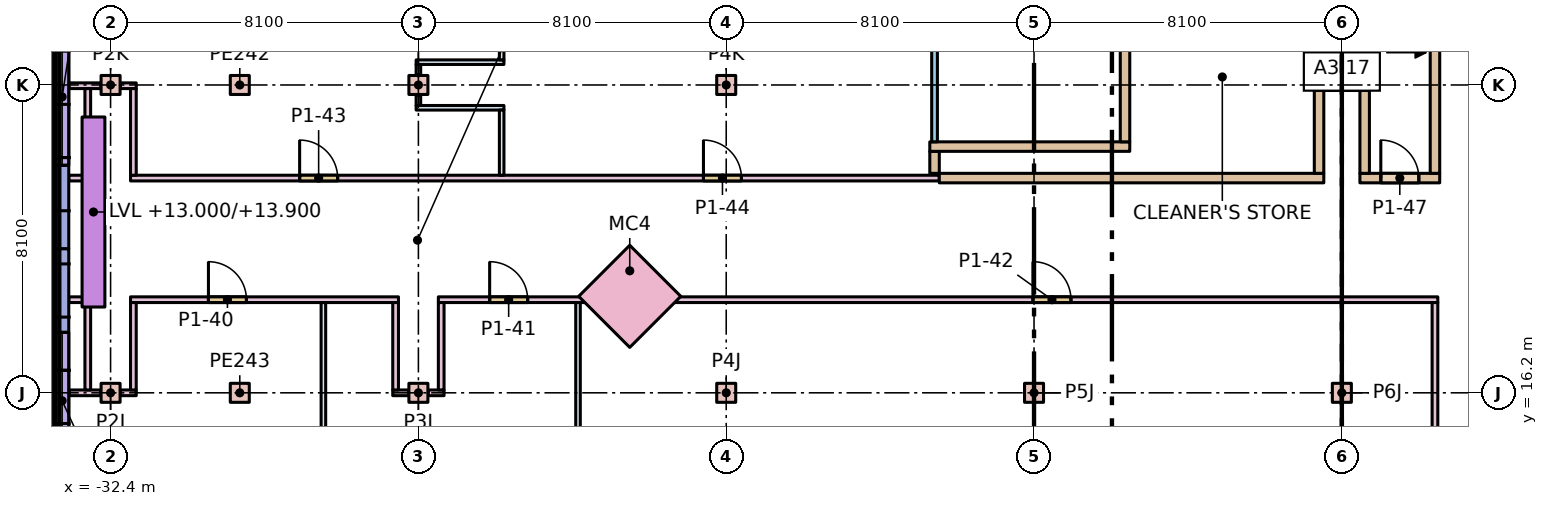
"""IFC4 building model, lengths in metres.
Left out: names, types, materials, properties, quantities, classifications, styles, units other than length and angle.
Written with IfcOpenShell. Run it as: python <this file> out.ifc"""

import sys

from ifc_helpers import new_model, si_unit, direction, frame, frame_2d, origin, origin_2d, place, context, subcontext, project, spatial, rectangle, extrude, element, fill, save


model = new_model("IFC4")
c1 = context("Model", 3, precision=1e-05, world=origin(), true_north=direction((0.0, 1.0)))
c2 = subcontext(c1, "Body", "Model", "MODEL_VIEW")
j1 = project(units=[si_unit("LENGTHUNIT", "METRE"), si_unit("PLANEANGLEUNIT", "RADIAN")], contexts=[c1])
p1 = place(None, origin())
s1 = spatial("IfcSite", under=j1, at=p1, CompositionType="ELEMENT")
p2 = place(p1, origin())
s2 = spatial("IfcBuilding", under=s1, at=p2, CompositionType="ELEMENT")
p3 = place(p2, frame((0.0, 0.0, 6.0)))
s3 = spatial("IfcBuildingStorey", under=s2, at=p3, CompositionType="ELEMENT", Elevation=6.0)
for number, where, z_axis, x_axis in (
    (1, (-32.4, 16.2, 0.0), (0.0, 0.0, 1.0), (1.0, 0.0, 0.0)),
    (2, (-32.4, 24.3, 0.0), (0.0, 0.0, 1.0), (1.0, 0.0, 0.0)),
    (3, (-24.3, 16.2, 0.0), (0.0, 0.0, 1.0), (1.0, 0.0, 0.0)),
    (4, (-24.3, 24.3, 0.0), (0.0, 0.0, 1.0), (1.0, 0.0, 0.0)),
    (5, (-16.2, 16.2, 0.0), (0.0, 0.0, 1.0), (1.0, 0.0, 0.0)),
    (6, (-16.2, 24.3, 0.0), (0.0, 0.0, 1.0), (1.0, 0.0, 0.0)),
    (7, (-8.1, 16.2, 0.0), (0.0, 0.0, 1.0), (1.0, 0.0, 0.0)),
    (8, (0.0, 16.2, 0.0), (0.0, 0.0, 1.0), (1.0, 0.0, 0.0)),
    (9, (-29.0, 24.3, 0.0), (0.0, 0.0, 1.0), (1.0, 0.0, 0.0)),
    (10, (-29.0, 16.2, 0.0), (0.0, 0.0, 1.0), (1.0, 0.0, 0.0)),
):
    element("IfcColumn", number, at=place(p3, frame(where, z_axis=z_axis, x_axis=x_axis)), inside=s3, PredefinedType="COLUMN", context=c2, shape_type="SweptSolid", body=[
        extrude(rectangle(XDim=0.5, YDim=0.5, at=origin_2d()), origin(), (0.0, 0.0, 1.0), 7.0),
    ])
p4 = place(p3, frame((-18.738, 18.738, 0.0), z_axis=(0.0, 0.0, 1.0), x_axis=(-0.707106781187, -0.707106781187, 0.0)))
e11 = element("IfcColumn", 11, at=p4, inside=s3, PredefinedType="COLUMN", context=c2, shape_type="SweptSolid", body=[
    extrude(rectangle(XDim=1.9, YDim=1.9, at=origin_2d()), origin(), (0.0, 0.0, 1.0), 7.0),
])
p5 = place(p3, frame((-33.675, 27.984, 0.0), z_axis=(0.0, 0.0, 1.0), x_axis=(0.0, -1.0, 0.0)))
e12 = element("IfcWall", 12, at=p5, inside=s3, PredefinedType="STANDARD", context=c2, shape_type="SweptSolid", body=[
    extrude(rectangle(XDim=7.995, YDim=0.35, at=frame_2d((3.998, 0.0))), origin(), (0.0, 0.0, 1.0), 6.68),
])
p6 = place(p5, frame((2.198, 0.0, 1.0)))
e13 = element("IfcOpeningElement", 13, at=p6, cuts=e12, PredefinedType="OPENING", context=c2, shape_type="SweptSolid", body=[
    extrude(rectangle(XDim=3.6, YDim=4.0, at=frame_2d((1.8, 2.0))), frame((0.0, 0.185, 0.0), z_axis=(0.0, -1.0, 0.0), x_axis=(1.0, 0.0, 0.0)), (0.0, 0.0, 1.0), 0.37),
])
p7 = place(p3, frame((-33.675, 19.989, 0.0), z_axis=(0.0, 0.0, 1.0), x_axis=(0.0, -1.0, 0.0)))
e14 = element("IfcWall", 14, at=p7, inside=s3, PredefinedType="STANDARD", context=c2, shape_type="SweptSolid", body=[
    extrude(rectangle(XDim=7.995, YDim=0.35, at=frame_2d((3.998, 0.0))), origin(), (0.0, 0.0, 1.0), 6.68),
])
p8 = place(p7, frame((2.198, 0.0, 1.0)))
e15 = element("IfcOpeningElement", 15, at=p8, cuts=e14, PredefinedType="OPENING", context=c2, shape_type="SweptSolid", body=[
    extrude(rectangle(XDim=3.6, YDim=4.0, at=frame_2d((1.8, 2.0))), frame((0.0, 0.185, 0.0), z_axis=(0.0, -1.0, 0.0), x_axis=(1.0, 0.0, 0.0)), (0.0, 0.0, 1.0), 0.37),
])
p9 = place(p3, frame((-32.85, 23.458, 7.0), z_axis=(0.0, 0.0, 1.0), x_axis=(0.0, -1.0, 0.0)))
e16 = element("IfcWall", 16, at=p9, inside=s3, PredefinedType="PARAPET", context=c2, shape_type="SweptSolid", body=[
    extrude(rectangle(XDim=5.0, YDim=0.6, at=frame_2d((2.5, 0.0))), origin(), (0.0, 0.0, 1.0), 0.9),
])
p10 = place(p3, frame((-10.593, 21.85, 0.0), z_axis=(0.0, 0.0, 1.0), x_axis=(1.0, 0.0, 0.0)))
e17 = element("IfcWall", 17, at=p10, inside=s3, PredefinedType="PARTITIONING", context=c2, shape_type="SweptSolid", body=[
    extrude(rectangle(XDim=10.118, YDim=0.25, at=frame_2d((5.059, 0.0))), origin(), (0.0, 0.0, 1.0), 6.68),
])
p11 = place(p3, frame((0.475, 21.85, 0.0), z_axis=(0.0, 0.0, 1.0), x_axis=(1.0, 0.0, 0.0)))
e18 = element("IfcWall", 18, at=p11, inside=s3, PredefinedType="PARTITIONING", context=c2, shape_type="SweptSolid", body=[
    extrude(rectangle(XDim=2.1, YDim=0.25, at=frame_2d((1.05, 0.0))), origin(), (0.0, 0.0, 1.0), 6.68),
])
p12 = place(p11, frame((0.55, 0.0, 0.0)))
e19 = element("IfcOpeningElement", 19, at=p12, cuts=e18, PredefinedType="OPENING", context=c2, shape_type="SweptSolid", body=[
    extrude(rectangle(XDim=1.0, YDim=2.1, at=frame_2d((0.5, 1.05))), frame((0.0, 0.135, 0.0), z_axis=(0.0, -1.0, 0.0), x_axis=(1.0, 0.0, 0.0)), (0.0, 0.0, 1.0), 0.27),
])
p13 = place(p3, frame((-0.725, 24.28, 0.0), z_axis=(0.0, 0.0, 1.0), x_axis=(1.0, 0.0, 0.0)))
e20 = element("IfcWall", 20, at=p13, inside=s3, PredefinedType="PARTITIONING", context=c2, shape_type="SweptSolid", body=[
    extrude(rectangle(XDim=1.45, YDim=0.25, at=frame_2d((0.725, 0.0))), origin(), (0.0, 0.0, 1.0), 6.68),
])
for number, where, z_axis, x_axis in (
    (21, (-0.6, 21.975, 0.0), (0.0, 0.0, 1.0), (0.0, 1.0, 0.0)),
    (22, (0.6, 21.975, 0.0), (0.0, 0.0, 1.0), (0.0, 1.0, 0.0)),
):
    element("IfcWall", number, at=place(p3, frame(where, z_axis=z_axis, x_axis=x_axis)), inside=s3, PredefinedType="PARTITIONING", context=c2, shape_type="SweptSolid", body=[
        extrude(rectangle(XDim=2.18, YDim=0.25, at=frame_2d((1.09, 0.0))), origin(), (0.0, 0.0, 1.0), 6.68),
    ])
p14 = place(p3, frame((-33.49, 16.2, 0.0), z_axis=(0.0, 0.0, 1.0), x_axis=(1.0, 0.0, 0.0)))
e23 = element("IfcWall", 23, at=p14, inside=s3, PredefinedType="PARTITIONING", context=c2, shape_type="SweptSolid", body=[
    extrude(rectangle(XDim=0.83, YDim=0.15, at=frame_2d((0.415, 0.0))), origin(), (0.0, 0.0, 1.0), 6.68),
])
p15 = place(p3, frame((-32.14, 16.2, 0.0), z_axis=(0.0, 0.0, 1.0), x_axis=(1.0, 0.0, 0.0)))
e24 = element("IfcWall", 24, at=p15, inside=s3, PredefinedType="PARTITIONING", context=c2, shape_type="SweptSolid", body=[
    extrude(rectangle(XDim=0.415, YDim=0.15, at=frame_2d((0.208, 0.0))), origin(), (0.0, 0.0, 1.0), 6.68),
])
p16 = place(p3, frame((-33.5, 18.65, 0.0), z_axis=(0.0, 0.0, 1.0), x_axis=(1.0, 0.0, 0.0)))
e25 = element("IfcWall", 25, at=p16, inside=s3, PredefinedType="PARTITIONING", context=c2, shape_type="SweptSolid", body=[
    extrude(rectangle(XDim=0.575, YDim=0.15, at=frame_2d((0.288, 0.0))), origin(), (0.0, 0.0, 1.0), 6.68),
])
p17 = place(p3, frame((-31.875, 18.65, 0.0), z_axis=(0.0, 0.0, 1.0), x_axis=(1.0, 0.0, 0.0)))
e26 = element("IfcWall", 26, at=p17, inside=s3, PredefinedType="PARTITIONING", context=c2, shape_type="SweptSolid", body=[
    extrude(rectangle(XDim=7.05, YDim=0.15, at=frame_2d((3.525, 0.0))), origin(), (0.0, 0.0, 1.0), 6.68),
])
p18 = place(p17, frame((2.05, 0.0, 0.0)))
e27 = element("IfcOpeningElement", 27, at=p18, cuts=e26, PredefinedType="OPENING", context=c2, shape_type="SweptSolid", body=[
    extrude(rectangle(XDim=1.0, YDim=2.1, at=frame_2d((0.5, 1.05))), frame((0.0, 0.085, 0.0), z_axis=(0.0, -1.0, 0.0), x_axis=(1.0, 0.0, 0.0)), (0.0, 0.0, 1.0), 0.17),
])
for number, where, z_axis, x_axis in (
    (28, (-33.0, 16.275, 0.0), (0.0, 0.0, 1.0), (0.0, 1.0, 0.0)),
    (29, (-31.8, 16.275, 0.0), (0.0, 0.0, 1.0), (0.0, 1.0, 0.0)),
):
    element("IfcWall", number, at=place(p3, frame(where, z_axis=z_axis, x_axis=x_axis)), inside=s3, PredefinedType="PARTITIONING", context=c2, shape_type="SweptSolid", body=[
        extrude(rectangle(XDim=2.3, YDim=0.15, at=frame_2d((1.15, 0.0))), origin(), (0.0, 0.0, 1.0), 6.68),
    ])
for number, where, z_axis, x_axis in (
    (30, (-24.975, 16.2, 0.0), (0.0, 0.0, 1.0), (1.0, 0.0, 0.0)),
    (31, (-24.04, 16.2, 0.0), (0.0, 0.0, 1.0), (1.0, 0.0, 0.0)),
):
    element("IfcWall", number, at=place(p3, frame(where, z_axis=z_axis, x_axis=x_axis)), inside=s3, PredefinedType="PARTITIONING", context=c2, shape_type="SweptSolid", body=[
        extrude(rectangle(XDim=0.415, YDim=0.15, at=frame_2d((0.208, 0.0))), origin(), (0.0, 0.0, 1.0), 6.68),
    ])
p19 = place(p3, frame((-23.775, 18.65, 0.0), z_axis=(0.0, 0.0, 1.0), x_axis=(1.0, 0.0, 0.0)))
e32 = element("IfcWall", 32, at=p19, inside=s3, PredefinedType="PARTITIONING", context=c2, shape_type="SweptSolid", body=[
    extrude(rectangle(XDim=4.077, YDim=0.15, at=frame_2d((2.038, 0.0))), origin(), (0.0, 0.0, 1.0), 6.68),
])
p20 = place(p19, frame((1.35, 0.0, 0.0)))
e33 = element("IfcOpeningElement", 33, at=p20, cuts=e32, PredefinedType="OPENING", context=c2, shape_type="SweptSolid", body=[
    extrude(rectangle(XDim=1.0, YDim=2.1, at=frame_2d((0.5, 1.05))), frame((0.0, 0.085, 0.0), z_axis=(0.0, -1.0, 0.0), x_axis=(1.0, 0.0, 0.0)), (0.0, 0.0, 1.0), 0.17),
])
for number, where, z_axis, x_axis in (
    (34, (-24.9, 16.275, 0.0), (0.0, 0.0, 1.0), (0.0, 1.0, 0.0)),
    (35, (-23.7, 16.275, 0.0), (0.0, 0.0, 1.0), (0.0, 1.0, 0.0)),
):
    element("IfcWall", number, at=place(p3, frame(where, z_axis=z_axis, x_axis=x_axis)), inside=s3, PredefinedType="PARTITIONING", context=c2, shape_type="SweptSolid", body=[
        extrude(rectangle(XDim=2.3, YDim=0.15, at=frame_2d((1.15, 0.0))), origin(), (0.0, 0.0, 1.0), 6.68),
    ])
p21 = place(p3, frame((-17.778, 18.65, 0.0), z_axis=(0.0, 0.0, 1.0), x_axis=(1.0, 0.0, 0.0)))
e36 = element("IfcWall", 36, at=p21, inside=s3, PredefinedType="PARTITIONING", context=c2, shape_type="SweptSolid", body=[
    extrude(rectangle(XDim=20.303, YDim=0.15, at=frame_2d((10.152, 0.0))), origin(), (0.0, 0.0, 1.0), 6.68),
])
p22 = place(p21, frame((9.65, 0.0, 0.0)))
e37 = element("IfcOpeningElement", 37, at=p22, cuts=e36, PredefinedType="OPENING", context=c2, shape_type="SweptSolid", body=[
    extrude(rectangle(XDim=1.0, YDim=2.1, at=frame_2d((0.5, 1.05))), frame((0.0, 0.085, 0.0), z_axis=(0.0, -1.0, 0.0), x_axis=(1.0, 0.0, 0.0)), (0.0, 0.0, 1.0), 0.17),
])
p23 = place(p3, frame((-33.5, 21.85, 0.0), z_axis=(0.0, 0.0, 1.0), x_axis=(1.0, 0.0, 0.0)))
e38 = element("IfcWall", 38, at=p23, inside=s3, PredefinedType="PARTITIONING", context=c2, shape_type="SweptSolid", body=[
    extrude(rectangle(XDim=0.575, YDim=0.15, at=frame_2d((0.288, 0.0))), origin(), (0.0, 0.0, 1.0), 6.68),
])
p24 = place(p3, frame((-31.875, 21.85, 0.0), z_axis=(0.0, 0.0, 1.0), x_axis=(1.0, 0.0, 0.0)))
e39 = element("IfcWall", 39, at=p24, inside=s3, PredefinedType="PARTITIONING", context=c2, shape_type="SweptSolid", body=[
    extrude(rectangle(XDim=21.282, YDim=0.15, at=frame_2d((10.641, 0.0))), origin(), (0.0, 0.0, 1.0), 6.68),
])
p25 = place(p24, frame((4.45, 0.0, 0.0)))
e40 = element("IfcOpeningElement", 40, at=p25, cuts=e39, PredefinedType="OPENING", context=c2, shape_type="SweptSolid", body=[
    extrude(rectangle(XDim=1.0, YDim=2.1, at=frame_2d((0.5, 1.05))), frame((0.0, 0.085, 0.0), z_axis=(0.0, -1.0, 0.0), x_axis=(1.0, 0.0, 0.0)), (0.0, 0.0, 1.0), 0.17),
])
p26 = place(p24, frame((15.076, 0.0, 0.0)))
e41 = element("IfcOpeningElement", 41, at=p26, cuts=e39, PredefinedType="OPENING", context=c2, shape_type="SweptSolid", body=[
    extrude(rectangle(XDim=1.0, YDim=2.1, at=frame_2d((0.5, 1.05))), frame((0.0, 0.085, 0.0), z_axis=(0.0, -1.0, 0.0), x_axis=(1.0, 0.0, 0.0)), (0.0, 0.0, 1.0), 0.17),
])
p27 = place(p3, frame((-33.49, 24.28, 0.0), z_axis=(0.0, 0.0, 1.0), x_axis=(1.0, 0.0, 0.0)))
e42 = element("IfcWall", 42, at=p27, inside=s3, PredefinedType="PARTITIONING", context=c2, shape_type="SweptSolid", body=[
    extrude(rectangle(XDim=0.83, YDim=0.15, at=frame_2d((0.415, 0.0))), origin(), (0.0, 0.0, 1.0), 6.68),
])
p28 = place(p3, frame((-32.14, 24.28, 0.0), z_axis=(0.0, 0.0, 1.0), x_axis=(1.0, 0.0, 0.0)))
e43 = element("IfcWall", 43, at=p28, inside=s3, PredefinedType="PARTITIONING", context=c2, shape_type="SweptSolid", body=[
    extrude(rectangle(XDim=0.415, YDim=0.15, at=frame_2d((0.208, 0.0))), origin(), (0.0, 0.0, 1.0), 6.68),
])
for number, where, z_axis, x_axis in (
    (44, (-33.0, 21.925, 0.0), (0.0, 0.0, 1.0), (0.0, 1.0, 0.0)),
    (45, (-31.8, 21.925, 0.0), (0.0, 0.0, 1.0), (0.0, 1.0, 0.0)),
):
    element("IfcWall", number, at=place(p3, frame(where, z_axis=z_axis, x_axis=x_axis)), inside=s3, PredefinedType="PARTITIONING", context=c2, shape_type="SweptSolid", body=[
        extrude(rectangle(XDim=2.28, YDim=0.15, at=frame_2d((1.14, 0.0))), origin(), (0.0, 0.0, 1.0), 6.68),
    ])
p29 = place(p3, frame((2.45, 21.975, 0.0), z_axis=(0.0, 0.0, 1.0), x_axis=(0.0, 1.0, 0.0)))
e46 = element("IfcWall", 46, at=p29, inside=s3, PredefinedType="PARTITIONING", context=c2, shape_type="SweptSolid", body=[
    extrude(rectangle(XDim=3.25, YDim=0.25, at=frame_2d((1.625, 0.0))), origin(), (0.0, 0.0, 1.0), 6.68),
])
p30 = place(p3, frame((2.45, 11.475, 0.0), z_axis=(0.0, 0.0, 1.0), x_axis=(0.0, 1.0, 0.0)))
e47 = element("IfcWall", 47, at=p30, inside=s3, PredefinedType="PARTITIONING", context=c2, shape_type="SweptSolid", body=[
    extrude(rectangle(XDim=7.1, YDim=0.15, at=frame_2d((3.55, 0.0))), origin(), (0.0, 0.0, 1.0), 6.68),
])
p31 = place(p3, frame((-10.718, 21.975, 0.0), z_axis=(0.0, 0.0, 1.0), x_axis=(0.0, 1.0, 0.0)))
e48 = element("IfcWall", 48, at=p31, inside=s3, PredefinedType="PARTITIONING", context=c2, shape_type="SweptSolid", body=[
    extrude(rectangle(XDim=0.579, YDim=0.25, at=frame_2d((0.289, 0.0))), origin(), (0.0, 0.0, 1.0), 6.68),
])
p32 = place(p3, frame((-10.843, 22.679, 0.0), z_axis=(0.0, 0.0, 1.0), x_axis=(1.0, 0.0, 0.0)))
e49 = element("IfcWall", 49, at=p32, inside=s3, PredefinedType="PARTITIONING", context=c2, shape_type="SweptSolid", body=[
    extrude(rectangle(XDim=5.262, YDim=0.25, at=frame_2d((2.631, 0.0))), origin(), (0.0, 0.0, 1.0), 6.68),
])
p33 = place(p3, frame((-5.706, 22.804, 0.0), z_axis=(0.0, 0.0, 1.0), x_axis=(0.0, 1.0, 0.0)))
e50 = element("IfcWall", 50, at=p33, inside=s3, PredefinedType="PARTITIONING", context=c2, shape_type="SweptSolid", body=[
    extrude(rectangle(XDim=6.893, YDim=0.25, at=frame_2d((3.446, 0.0))), origin(), (0.0, 0.0, 1.0), 6.68),
])
p34 = place(p3, frame((-26.8, 8.76, 0.0), z_axis=(0.0, 0.0, 1.0), x_axis=(0.0, 1.0, 0.0)))
e51 = element("IfcWall", 51, at=p34, inside=s3, PredefinedType="PARTITIONING", context=c2, shape_type="SweptSolid", body=[
    extrude(rectangle(XDim=9.815, YDim=0.12, at=frame_2d((4.907, 0.0))), origin(), (0.0, 0.0, 1.0), 6.68),
])
p35 = place(p3, frame((-20.1, -2.375, 0.0), z_axis=(0.0, 0.0, 1.0), x_axis=(0.0, 1.0, 0.0)))
e52 = element("IfcWall", 52, at=p35, inside=s3, PredefinedType="PARTITIONING", context=c2, shape_type="SweptSolid", body=[
    extrude(rectangle(XDim=20.95, YDim=0.12, at=frame_2d((10.475, 0.0))), origin(), (0.0, 0.0, 1.0), 6.68),
])
for number, where, z_axis, x_axis in (
    (53, (-24.36, 23.7, 0.0), (0.0, 0.0, 1.0), (1.0, 0.0, 0.0)),
    (54, (-24.36, 24.9, 0.0), (0.0, 0.0, 1.0), (1.0, 0.0, 0.0)),
):
    element("IfcWall", number, at=place(p3, frame(where, z_axis=z_axis, x_axis=x_axis)), inside=s3, PredefinedType="PARTITIONING", context=c2, shape_type="SweptSolid", body=[
        extrude(rectangle(XDim=2.311, YDim=0.12, at=frame_2d((1.156, 0.0))), origin(), (0.0, 0.0, 1.0), 6.68),
    ])
for number, where, z_axis, x_axis in (
    (55, (-24.3, 23.76, 0.0), (0.0, 0.0, 1.0), (0.0, 1.0, 0.0)),
    (56, (-24.3, 24.56, 0.0), (0.0, 0.0, 1.0), (0.0, 1.0, 0.0)),
):
    element("IfcWall", number, at=place(p3, frame(where, z_axis=z_axis, x_axis=x_axis)), inside=s3, PredefinedType="PARTITIONING", context=c2, shape_type="SweptSolid", body=[
        extrude(rectangle(XDim=0.28, YDim=0.12, at=frame_2d((0.14, 0.0))), origin(), (0.0, 0.0, 1.0), 6.68),
    ])
p36 = place(p3, frame((-22.109, 21.925, 0.0), z_axis=(0.0, 0.0, 1.0), x_axis=(0.0, 1.0, 0.0)))
e57 = element("IfcWall", 57, at=p36, inside=s3, PredefinedType="PARTITIONING", context=c2, shape_type="SweptSolid", body=[
    extrude(rectangle(XDim=1.715, YDim=0.12, at=frame_2d((0.857, 0.0))), origin(), (0.0, 0.0, 1.0), 6.68),
])
p37 = place(p3, frame((-22.109, 24.96, 0.0), z_axis=(0.0, 0.0, 1.0), x_axis=(0.0, 1.0, 0.0)))
e58 = element("IfcWall", 58, at=p37, inside=s3, PredefinedType="PARTITIONING", context=c2, shape_type="SweptSolid", body=[
    extrude(rectangle(XDim=6.78, YDim=0.12, at=frame_2d((3.39, 0.0))), origin(), (0.0, 0.0, 1.0), 6.68),
])
p38 = place(p3, frame((-10.718, 22.804, 0.0), z_axis=(0.0, 0.0, 1.0), x_axis=(0.0, 1.0, 0.0)))
e59 = element("IfcWall", 59, at=p38, inside=s3, PredefinedType="PARTITIONING", context=c2, shape_type="SweptSolid", body=[
    extrude(rectangle(XDim=11.771, YDim=0.15, at=frame_2d((5.886, 0.0))), origin(), (0.0, 0.0, 1.0), 6.68),
])
p39 = place(p6, origin())
e60 = element("IfcWindow", 60, at=p39, inside=s3, PartitioningType="SINGLE_PANEL", PredefinedType="WINDOW", context=c2, shape_type="SweptSolid", body=[
    extrude(rectangle(XDim=3.6, YDim=4.0, at=frame_2d((1.8, 2.0))), frame((0.0, 0.03, 0.0), z_axis=(0.0, -1.0, 0.0), x_axis=(1.0, 0.0, 0.0)), (0.0, 0.0, 1.0), 0.06),
])
fill(e13, e60)
p40 = place(p8, origin())
e61 = element("IfcWindow", 61, at=p40, inside=s3, PartitioningType="SINGLE_PANEL", PredefinedType="WINDOW", context=c2, shape_type="SweptSolid", body=[
    extrude(rectangle(XDim=3.6, YDim=4.0, at=frame_2d((1.8, 2.0))), frame((0.0, 0.03, 0.0), z_axis=(0.0, -1.0, 0.0), x_axis=(1.0, 0.0, 0.0)), (0.0, 0.0, 1.0), 0.06),
])
fill(e15, e61)
p41 = place(p18, origin())
e62 = element("IfcDoor", 62, at=p41, inside=s3, OperationType="SINGLE_SWING_LEFT", PredefinedType="DOOR", context=c2, shape_type="SweptSolid", body=[
    extrude(rectangle(XDim=1.0, YDim=2.1, at=frame_2d((0.5, 1.05))), frame((0.0, 0.025, 0.0), z_axis=(0.0, -1.0, 0.0), x_axis=(1.0, 0.0, 0.0)), (0.0, 0.0, 1.0), 0.05),
])
fill(e27, e62)
p42 = place(p20, origin())
e63 = element("IfcDoor", 63, at=p42, inside=s3, OperationType="SINGLE_SWING_LEFT", PredefinedType="DOOR", context=c2, shape_type="SweptSolid", body=[
    extrude(rectangle(XDim=1.0, YDim=2.1, at=frame_2d((0.5, 1.05))), frame((0.0, 0.025, 0.0), z_axis=(0.0, -1.0, 0.0), x_axis=(1.0, 0.0, 0.0)), (0.0, 0.0, 1.0), 0.05),
])
fill(e33, e63)
p43 = place(p22, origin())
e64 = element("IfcDoor", 64, at=p43, inside=s3, OperationType="SINGLE_SWING_LEFT", PredefinedType="DOOR", context=c2, shape_type="SweptSolid", body=[
    extrude(rectangle(XDim=1.0, YDim=2.1, at=frame_2d((0.5, 1.05))), frame((0.0, 0.025, 0.0), z_axis=(0.0, -1.0, 0.0), x_axis=(1.0, 0.0, 0.0)), (0.0, 0.0, 1.0), 0.05),
])
fill(e37, e64)
p44 = place(p25, origin())
e65 = element("IfcDoor", 65, at=p44, inside=s3, OperationType="SINGLE_SWING_LEFT", PredefinedType="DOOR", context=c2, shape_type="SweptSolid", body=[
    extrude(rectangle(XDim=1.0, YDim=2.1, at=frame_2d((0.5, 1.05))), frame((0.0, 0.025, 0.0), z_axis=(0.0, -1.0, 0.0), x_axis=(1.0, 0.0, 0.0)), (0.0, 0.0, 1.0), 0.05),
])
fill(e40, e65)
p45 = place(p26, origin())
e66 = element("IfcDoor", 66, at=p45, inside=s3, OperationType="SINGLE_SWING_LEFT", PredefinedType="DOOR", context=c2, shape_type="SweptSolid", body=[
    extrude(rectangle(XDim=1.0, YDim=2.1, at=frame_2d((0.5, 1.05))), frame((0.0, 0.025, 0.0), z_axis=(0.0, -1.0, 0.0), x_axis=(1.0, 0.0, 0.0)), (0.0, 0.0, 1.0), 0.05),
])
fill(e41, e66)
p46 = place(p12, origin())
e67 = element("IfcDoor", 67, at=p46, inside=s3, OperationType="SINGLE_SWING_LEFT", PredefinedType="DOOR", context=c2, shape_type="SweptSolid", body=[
    extrude(rectangle(XDim=1.0, YDim=2.1, at=frame_2d((0.5, 1.05))), frame((0.0, 0.025, 0.0), z_axis=(0.0, -1.0, 0.0), x_axis=(1.0, 0.0, 0.0)), (0.0, 0.0, 1.0), 0.05),
])
fill(e19, e67)
save(model, sys.argv[1])
